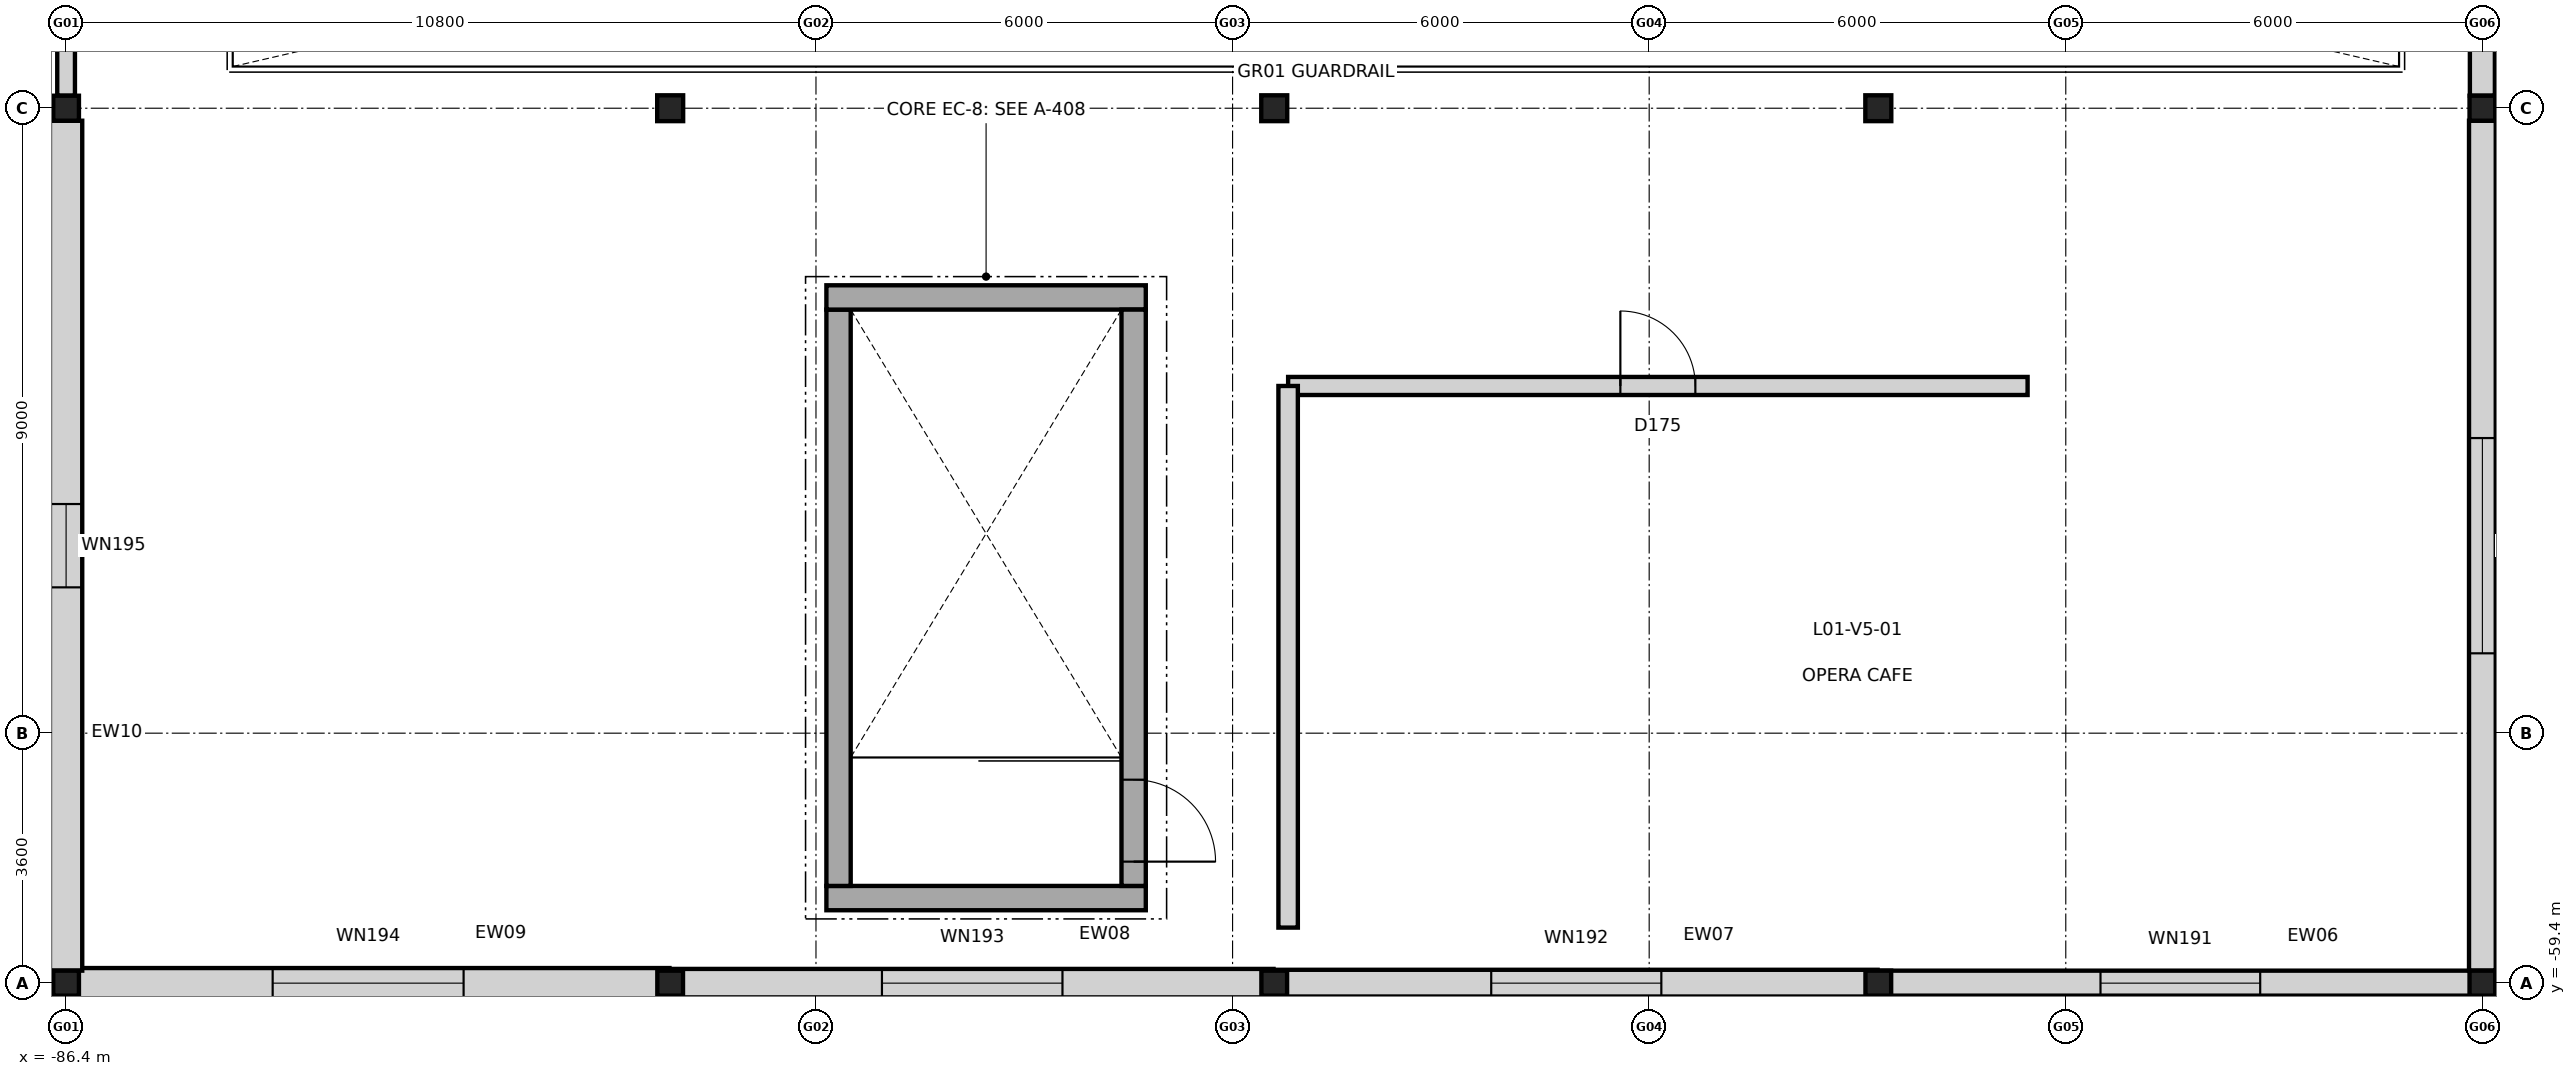
"""IFC4 building model, lengths in metres.
Left out: names, types, materials, properties, quantities, classifications, styles, units other than length and angle.
Written with IfcOpenShell. Run it as: python <this file> out.ifc"""

import sys

from ifc_helpers import new_model, si_unit, direction, frame, frame_2d, origin, origin_2d, place, context, subcontext, project, spatial, rectangle, i_section, extrude, element, fill, save


model = new_model("IFC4")
c1 = context("Model", 3, precision=1e-05, world=origin(), true_north=direction((0.0, 1.0)))
c2 = subcontext(c1, "Body", "Model", "MODEL_VIEW")
j1 = project(units=[si_unit("LENGTHUNIT", "METRE"), si_unit("PLANEANGLEUNIT", "RADIAN")], contexts=[c1])
p1 = place(None, origin())
s1 = spatial("IfcSite", under=j1, at=p1, CompositionType="ELEMENT")
p2 = place(p1, origin())
s2 = spatial("IfcBuilding", under=s1, at=p2, CompositionType="ELEMENT")
p3 = place(p2, frame((0.0, 0.0, 5.4)))
s3 = spatial("IfcBuildingStorey", under=s2, at=p3, CompositionType="ELEMENT", Elevation=5.4)
for number, where, z_axis, x_axis in (
    (1, (-86.4, -59.4, 0.0), (0.0, 0.0, 1.0), (1.0, 0.0, 0.0)),
    (2, (-86.4, -46.8, 0.0), (0.0, 0.0, 1.0), (1.0, 0.0, 0.0)),
    (3, (-77.7, -59.4, 0.0), (0.0, 0.0, 1.0), (1.0, 0.0, 0.0)),
):
    element("IfcColumn", number, at=place(p3, frame(where, z_axis=z_axis, x_axis=x_axis)), inside=s3, PredefinedType="COLUMN", context=c2, shape_type="SweptSolid", body=[
        extrude(i_section(OverallWidth=0.37, OverallDepth=0.36, WebThickness=0.012, FlangeThickness=0.02, at=origin_2d()), origin(), (0.0, 0.0, 1.0), 4.8),
    ])
p4 = place(p3, frame((-77.7, -46.8, 0.0), z_axis=(0.0, 0.0, 1.0), x_axis=(1.0, 0.0, 0.0)))
e4 = element("IfcColumn", 4, at=p4, inside=s3, PredefinedType="COLUMN", context=c2, shape_type="SweptSolid", body=[
    extrude(i_section(OverallWidth=0.374, OverallDepth=0.372, WebThickness=0.016, FlangeThickness=0.026, at=origin_2d()), origin(), (0.0, 0.0, 1.0), 4.8),
])
p5 = place(p3, frame((-69.0, -59.4, 0.0), z_axis=(0.0, 0.0, 1.0), x_axis=(1.0, 0.0, 0.0)))
e5 = element("IfcColumn", 5, at=p5, inside=s3, PredefinedType="COLUMN", context=c2, shape_type="SweptSolid", body=[
    extrude(i_section(OverallWidth=0.37, OverallDepth=0.36, WebThickness=0.012, FlangeThickness=0.02, at=origin_2d()), origin(), (0.0, 0.0, 1.0), 4.8),
])
p6 = place(p3, frame((-69.0, -46.8, 0.0), z_axis=(0.0, 0.0, 1.0), x_axis=(1.0, 0.0, 0.0)))
e6 = element("IfcColumn", 6, at=p6, inside=s3, PredefinedType="COLUMN", context=c2, shape_type="SweptSolid", body=[
    extrude(i_section(OverallWidth=0.374, OverallDepth=0.372, WebThickness=0.016, FlangeThickness=0.026, at=origin_2d()), origin(), (0.0, 0.0, 1.0), 4.8),
])
p7 = place(p3, frame((-60.3, -59.4, 0.0), z_axis=(0.0, 0.0, 1.0), x_axis=(1.0, 0.0, 0.0)))
e7 = element("IfcColumn", 7, at=p7, inside=s3, PredefinedType="COLUMN", context=c2, shape_type="SweptSolid", body=[
    extrude(i_section(OverallWidth=0.37, OverallDepth=0.36, WebThickness=0.012, FlangeThickness=0.02, at=origin_2d()), origin(), (0.0, 0.0, 1.0), 4.8),
])
p8 = place(p3, frame((-60.3, -46.8, 0.0), z_axis=(0.0, 0.0, 1.0), x_axis=(1.0, 0.0, 0.0)))
e8 = element("IfcColumn", 8, at=p8, inside=s3, PredefinedType="COLUMN", context=c2, shape_type="SweptSolid", body=[
    extrude(i_section(OverallWidth=0.374, OverallDepth=0.372, WebThickness=0.016, FlangeThickness=0.026, at=origin_2d()), origin(), (0.0, 0.0, 1.0), 4.8),
])
for number, where, z_axis, x_axis in (
    (9, (-51.6, -59.4, 0.0), (0.0, 0.0, 1.0), (1.0, 0.0, 0.0)),
    (10, (-51.6, -46.8, 0.0), (0.0, 0.0, 1.0), (1.0, 0.0, 0.0)),
):
    element("IfcColumn", number, at=place(p3, frame(where, z_axis=z_axis, x_axis=x_axis)), inside=s3, PredefinedType="COLUMN", context=c2, shape_type="SweptSolid", body=[
        extrude(i_section(OverallWidth=0.37, OverallDepth=0.36, WebThickness=0.012, FlangeThickness=0.02, at=origin_2d()), origin(), (0.0, 0.0, 1.0), 4.8),
    ])
p9 = place(p3, frame((-51.61, -59.4, 0.0), z_axis=(0.0, 0.0, 1.0), x_axis=(-1.0, 0.0, 0.0)))
e11 = element("IfcWall", 11, at=p9, inside=s3, PredefinedType="STANDARD", context=c2, shape_type="SweptSolid", body=[
    extrude(rectangle(XDim=8.68, YDim=0.36, at=frame_2d((4.34, 0.0))), origin(), (0.0, 0.0, 1.0), 3.597),
])
p10 = place(p9, frame((3.19, 0.0, 0.85)))
e12 = element("IfcOpeningElement", 12, at=p10, cuts=e11, PredefinedType="OPENING", context=c2, shape_type="SweptSolid", body=[
    extrude(rectangle(XDim=2.3, YDim=1.85, at=frame_2d((1.15, 0.925))), frame((0.0, 0.19, 0.0), z_axis=(0.0, -1.0, 0.0), x_axis=(1.0, 0.0, 0.0)), (0.0, 0.0, 1.0), 0.38),
])
p11 = place(p3, frame((-60.31, -59.4, 0.0), z_axis=(0.0, 0.0, 1.0), x_axis=(-1.0, 0.0, 0.0)))
e13 = element("IfcWall", 13, at=p11, inside=s3, PredefinedType="STANDARD", context=c2, shape_type="SweptSolid", body=[
    extrude(rectangle(XDim=8.68, YDim=0.385, at=frame_2d((4.34, 0.0))), origin(), (0.0, 0.0, 1.0), 3.597),
])
p12 = place(p11, frame((3.115, 0.0, 0.85)))
e14 = element("IfcOpeningElement", 14, at=p12, cuts=e13, PredefinedType="OPENING", context=c2, shape_type="SweptSolid", body=[
    extrude(rectangle(XDim=2.45, YDim=1.95, at=frame_2d((1.225, 0.975))), frame((0.0, 0.202, 0.0), z_axis=(0.0, -1.0, 0.0), x_axis=(1.0, 0.0, 0.0)), (0.0, 0.0, 1.0), 0.405),
])
p13 = place(p3, frame((-69.01, -59.4, 0.0), z_axis=(0.0, 0.0, 1.0), x_axis=(-1.0, 0.0, 0.0)))
e15 = element("IfcWall", 15, at=p13, inside=s3, PredefinedType="STANDARD", context=c2, shape_type="SweptSolid", body=[
    extrude(rectangle(XDim=8.68, YDim=0.41, at=frame_2d((4.34, 0.0))), origin(), (0.0, 0.0, 1.0), 3.597),
])
p14 = place(p13, frame((3.04, 0.0, 0.85)))
e16 = element("IfcOpeningElement", 16, at=p14, cuts=e15, PredefinedType="OPENING", context=c2, shape_type="SweptSolid", body=[
    extrude(rectangle(XDim=2.6, YDim=1.95, at=frame_2d((1.3, 0.975))), frame((0.0, 0.215, 0.0), z_axis=(0.0, -1.0, 0.0), x_axis=(1.0, 0.0, 0.0)), (0.0, 0.0, 1.0), 0.43),
])
p15 = place(p3, frame((-77.71, -59.4, 0.0), z_axis=(0.0, 0.0, 1.0), x_axis=(-1.0, 0.0, 0.0)))
e17 = element("IfcWall", 17, at=p15, inside=s3, PredefinedType="STANDARD", context=c2, shape_type="SweptSolid", body=[
    extrude(rectangle(XDim=8.68, YDim=0.435, at=frame_2d((4.34, 0.0))), origin(), (0.0, 0.0, 1.0), 3.597),
])
p16 = place(p15, frame((2.965, 0.0, 0.85)))
e18 = element("IfcOpeningElement", 18, at=p16, cuts=e17, PredefinedType="OPENING", context=c2, shape_type="SweptSolid", body=[
    extrude(rectangle(XDim=2.75, YDim=1.95, at=frame_2d((1.375, 0.975))), frame((0.0, 0.228, 0.0), z_axis=(0.0, -1.0, 0.0), x_axis=(1.0, 0.0, 0.0)), (0.0, 0.0, 1.0), 0.455),
])
p17 = place(p3, frame((-86.4, -59.22, 0.0), z_axis=(0.0, 0.0, 1.0), x_axis=(0.0, 1.0, 0.0)))
e19 = element("IfcWall", 19, at=p17, inside=s3, PredefinedType="STANDARD", context=c2, shape_type="SweptSolid", body=[
    extrude(rectangle(XDim=12.24, YDim=0.465, at=frame_2d((6.12, 0.0))), origin(), (0.0, 0.0, 1.0), 4.095),
])
p18 = place(p17, frame((5.52, 0.0, 0.85)))
e20 = element("IfcOpeningElement", 20, at=p18, cuts=e19, PredefinedType="OPENING", context=c2, shape_type="SweptSolid", body=[
    extrude(rectangle(XDim=1.2, YDim=2.1, at=frame_2d((0.6, 1.05))), frame((0.0, 0.242, 0.0), z_axis=(0.0, -1.0, 0.0), x_axis=(1.0, 0.0, 0.0)), (0.0, 0.0, 1.0), 0.485),
])
p19 = place(p3, frame((-86.4, -46.62, 0.0), z_axis=(0.0, 0.0, 1.0), x_axis=(0.0, 1.0, 0.0)))
e21 = element("IfcWall", 21, at=p19, inside=s3, PredefinedType="STANDARD", context=c2, shape_type="SweptSolid", body=[
    extrude(rectangle(XDim=8.64, YDim=0.255, at=frame_2d((4.32, 0.0))), origin(), (0.0, 0.0, 1.0), 4.095),
])
p20 = place(p19, frame((3.595, 0.0, 0.85)))
e22 = element("IfcOpeningElement", 22, at=p20, cuts=e21, PredefinedType="OPENING", context=c2, shape_type="SweptSolid", body=[
    extrude(rectangle(XDim=1.45, YDim=2.1, at=frame_2d((0.725, 1.05))), frame((0.0, 0.137, 0.0), z_axis=(0.0, -1.0, 0.0), x_axis=(1.0, 0.0, 0.0)), (0.0, 0.0, 1.0), 0.275),
])
p21 = place(p3, frame((-51.6, -37.98, 0.0), z_axis=(0.0, 0.0, 1.0), x_axis=(0.0, -1.0, 0.0)))
e23 = element("IfcWall", 23, at=p21, inside=s3, PredefinedType="STANDARD", context=c2, shape_type="SweptSolid", body=[
    extrude(rectangle(XDim=8.64, YDim=0.36, at=frame_2d((4.32, 0.0))), origin(), (0.0, 0.0, 1.0), 4.095),
])
p22 = place(p21, frame((2.895, 0.0, 0.85)))
e24 = element("IfcOpeningElement", 24, at=p22, cuts=e23, PredefinedType="OPENING", context=c2, shape_type="SweptSolid", body=[
    extrude(rectangle(XDim=2.85, YDim=2.1, at=frame_2d((1.425, 1.05))), frame((0.0, 0.19, 0.0), z_axis=(0.0, -1.0, 0.0), x_axis=(1.0, 0.0, 0.0)), (0.0, 0.0, 1.0), 0.38),
])
p23 = place(p3, frame((-51.6, -46.98, 0.0), z_axis=(0.0, 0.0, 1.0), x_axis=(0.0, -1.0, 0.0)))
e25 = element("IfcWall", 25, at=p23, inside=s3, PredefinedType="STANDARD", context=c2, shape_type="SweptSolid", body=[
    extrude(rectangle(XDim=12.24, YDim=0.385, at=frame_2d((6.12, 0.0))), origin(), (0.0, 0.0, 1.0), 4.095),
])
p24 = place(p23, frame((4.57, 0.0, 0.85)))
e26 = element("IfcOpeningElement", 26, at=p24, cuts=e25, PredefinedType="OPENING", context=c2, shape_type="SweptSolid", body=[
    extrude(rectangle(XDim=3.1, YDim=2.1, at=frame_2d((1.55, 1.05))), frame((0.0, 0.202, 0.0), z_axis=(0.0, -1.0, 0.0), x_axis=(1.0, 0.0, 0.0)), (0.0, 0.0, 1.0), 0.405),
])
p25 = place(p3, frame((-70.85, -58.175, 0.0), z_axis=(0.0, 0.0, 1.0), x_axis=(-1.0, 0.0, 0.0)))
e27 = element("IfcWall", 27, at=p25, inside=s3, PredefinedType="SHEAR", context=c2, shape_type="SweptSolid", body=[
    extrude(rectangle(XDim=4.6, YDim=0.35, at=frame_2d((2.3, 0.0))), origin(), (0.0, 0.0, 1.0), 4.045),
])
p26 = place(p3, frame((-75.275, -58.0, 0.0), z_axis=(0.0, 0.0, 1.0), x_axis=(0.0, 1.0, 0.0)))
e28 = element("IfcWall", 28, at=p26, inside=s3, PredefinedType="SHEAR", context=c2, shape_type="SweptSolid", body=[
    extrude(rectangle(XDim=8.3, YDim=0.35, at=frame_2d((4.15, 0.0))), origin(), (0.0, 0.0, 1.0), 4.045),
])
p27 = place(p3, frame((-75.45, -49.525, 0.0), z_axis=(0.0, 0.0, 1.0), x_axis=(1.0, 0.0, 0.0)))
e29 = element("IfcWall", 29, at=p27, inside=s3, PredefinedType="SHEAR", context=c2, shape_type="SweptSolid", body=[
    extrude(rectangle(XDim=4.6, YDim=0.35, at=frame_2d((2.3, 0.0))), origin(), (0.0, 0.0, 1.0), 4.045),
])
p28 = place(p3, frame((-71.025, -49.7, 0.0), z_axis=(0.0, 0.0, 1.0), x_axis=(0.0, -1.0, 0.0)))
e30 = element("IfcWall", 30, at=p28, inside=s3, PredefinedType="SHEAR", context=c2, shape_type="SweptSolid", body=[
    extrude(rectangle(XDim=8.3, YDim=0.35, at=frame_2d((4.15, 0.0))), origin(), (0.0, 0.0, 1.0), 4.045),
])
p29 = place(p28, frame((6.77, 0.0, 0.0)))
e31 = element("IfcOpeningElement", 31, at=p29, cuts=e30, PredefinedType="OPENING", context=c2, shape_type="SweptSolid", body=[
    extrude(rectangle(XDim=1.18, YDim=2.15, at=frame_2d((0.59, 1.075))), frame((0.0, 0.185, 0.0), z_axis=(0.0, -1.0, 0.0), x_axis=(1.0, 0.0, 0.0)), (0.0, 0.0, 1.0), 0.37),
])
p30 = place(p3, frame((-68.8, -50.8, 0.0), z_axis=(0.0, 0.0, 1.0), x_axis=(1.0, 0.0, 0.0)))
e32 = element("IfcWall", 32, at=p30, inside=s3, PredefinedType="PARTITIONING", context=c2, shape_type="SweptSolid", body=[
    extrude(rectangle(XDim=10.65, YDim=0.26, at=frame_2d((5.325, 0.0))), origin(), (0.0, 0.0, 1.0), 4.42),
])
p31 = place(p30, frame((4.785, 0.0, 0.0)))
e33 = element("IfcOpeningElement", 33, at=p31, cuts=e32, PredefinedType="OPENING", context=c2, shape_type="SweptSolid", body=[
    extrude(rectangle(XDim=1.08, YDim=2.25, at=frame_2d((0.54, 1.125))), frame((0.0, 0.14, 0.0), z_axis=(0.0, -1.0, 0.0), x_axis=(1.0, 0.0, 0.0)), (0.0, 0.0, 1.0), 0.28),
])
p32 = place(p3, frame((-68.8, -58.6, 0.0), z_axis=(0.0, 0.0, 1.0), x_axis=(0.0, 1.0, 0.0)))
e34 = element("IfcWall", 34, at=p32, inside=s3, PredefinedType="PARTITIONING", context=c2, shape_type="SweptSolid", body=[
    extrude(rectangle(XDim=7.8, YDim=0.28, at=frame_2d((3.9, 0.0))), origin(), (0.0, 0.0, 1.0), 4.095),
])
p33 = place(p10, origin())
e35 = element("IfcWindow", 35, at=p33, inside=s3, PartitioningType="SINGLE_PANEL", PredefinedType="WINDOW", context=c2, shape_type="SweptSolid", body=[
    extrude(rectangle(XDim=2.3, YDim=1.85, at=frame_2d((1.15, 0.925))), frame((0.0, 0.03, 0.0), z_axis=(0.0, -1.0, 0.0), x_axis=(1.0, 0.0, 0.0)), (0.0, 0.0, 1.0), 0.06),
])
fill(e12, e35)
p34 = place(p12, origin())
e36 = element("IfcWindow", 36, at=p34, inside=s3, PartitioningType="SINGLE_PANEL", PredefinedType="WINDOW", context=c2, shape_type="SweptSolid", body=[
    extrude(rectangle(XDim=2.45, YDim=1.95, at=frame_2d((1.225, 0.975))), frame((0.0, 0.03, 0.0), z_axis=(0.0, -1.0, 0.0), x_axis=(1.0, 0.0, 0.0)), (0.0, 0.0, 1.0), 0.06),
])
fill(e14, e36)
p35 = place(p14, origin())
e37 = element("IfcWindow", 37, at=p35, inside=s3, PartitioningType="SINGLE_PANEL", PredefinedType="WINDOW", context=c2, shape_type="SweptSolid", body=[
    extrude(rectangle(XDim=2.6, YDim=1.95, at=frame_2d((1.3, 0.975))), frame((0.0, 0.03, 0.0), z_axis=(0.0, -1.0, 0.0), x_axis=(1.0, 0.0, 0.0)), (0.0, 0.0, 1.0), 0.06),
])
fill(e16, e37)
p36 = place(p16, origin())
e38 = element("IfcWindow", 38, at=p36, inside=s3, PartitioningType="SINGLE_PANEL", PredefinedType="WINDOW", context=c2, shape_type="SweptSolid", body=[
    extrude(rectangle(XDim=2.75, YDim=1.95, at=frame_2d((1.375, 0.975))), frame((0.0, 0.03, 0.0), z_axis=(0.0, -1.0, 0.0), x_axis=(1.0, 0.0, 0.0)), (0.0, 0.0, 1.0), 0.06),
])
fill(e18, e38)
p37 = place(p18, origin())
e39 = element("IfcWindow", 39, at=p37, inside=s3, PartitioningType="SINGLE_PANEL", PredefinedType="WINDOW", context=c2, shape_type="SweptSolid", body=[
    extrude(rectangle(XDim=1.2, YDim=2.1, at=frame_2d((0.6, 1.05))), frame((0.0, 0.03, 0.0), z_axis=(0.0, -1.0, 0.0), x_axis=(1.0, 0.0, 0.0)), (0.0, 0.0, 1.0), 0.06),
])
fill(e20, e39)
p38 = place(p24, origin())
e40 = element("IfcWindow", 40, at=p38, inside=s3, PartitioningType="SINGLE_PANEL", PredefinedType="WINDOW", context=c2, shape_type="SweptSolid", body=[
    extrude(rectangle(XDim=3.1, YDim=2.1, at=frame_2d((1.55, 1.05))), frame((0.0, 0.03, 0.0), z_axis=(0.0, -1.0, 0.0), x_axis=(1.0, 0.0, 0.0)), (0.0, 0.0, 1.0), 0.06),
])
fill(e26, e40)
p39 = place(p29, origin())
e41 = element("IfcDoor", 41, at=p39, inside=s3, OperationType="SINGLE_SWING_RIGHT", PredefinedType="DOOR", context=c2, shape_type="SweptSolid", body=[
    extrude(rectangle(XDim=1.18, YDim=2.15, at=frame_2d((0.59, 1.075))), frame((0.0, 0.025, 0.0), z_axis=(0.0, -1.0, 0.0), x_axis=(1.0, 0.0, 0.0)), (0.0, 0.0, 1.0), 0.05),
])
fill(e31, e41)
p40 = place(p31, origin())
e42 = element("IfcDoor", 42, at=p40, inside=s3, OperationType="SINGLE_SWING_LEFT", PredefinedType="DOOR", context=c2, shape_type="SweptSolid", body=[
    extrude(rectangle(XDim=1.08, YDim=2.25, at=frame_2d((0.54, 1.125))), frame((0.0, 0.025, 0.0), z_axis=(0.0, -1.0, 0.0), x_axis=(1.0, 0.0, 0.0)), (0.0, 0.0, 1.0), 0.05),
])
fill(e33, e42)
save(model, sys.argv[1])
